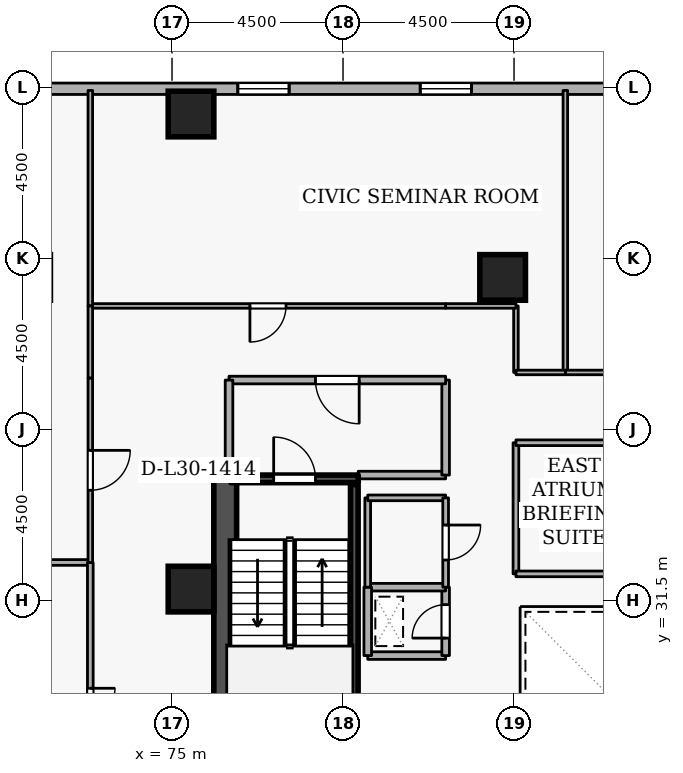
"""IFC4 building model, lengths in metres.
Left out: names, types, materials, properties, quantities, classifications, styles, units other than length and angle.
Written with IfcOpenShell. Run it as: python <this file> out.ifc"""

import sys

from ifc_helpers import new_model, si_unit, direction, frame, frame_2d, origin, origin_2d, place, context, subcontext, project, spatial, rectangle, extrude, element, fill, save


model = new_model("IFC4")
c1 = context("Model", 3, precision=1e-05, world=origin(), true_north=direction((0.0, 1.0)))
c2 = subcontext(c1, "Body", "Model", "MODEL_VIEW")
j1 = project(units=[si_unit("LENGTHUNIT", "METRE"), si_unit("PLANEANGLEUNIT", "RADIAN")], contexts=[c1])
p1 = place(None, origin())
s1 = spatial("IfcSite", under=j1, at=p1, CompositionType="ELEMENT")
p2 = place(p1, origin())
s2 = spatial("IfcBuilding", under=s1, at=p2, CompositionType="ELEMENT")
p3 = place(p2, frame((0.0, 0.0, 116.1)))
s3 = spatial("IfcBuildingStorey", under=s2, at=p3, CompositionType="ELEMENT", Elevation=116.1)
p4 = place(p3, frame((76.4, 19.2, 0.0), z_axis=(0.0, 0.0, 1.0), x_axis=(0.0, 1.0, 0.0)))
e1 = element("IfcWall", 1, at=p4, inside=s3, PredefinedType="SHEAR", context=c2, shape_type="SweptSolid", body=[
    extrude(rectangle(XDim=15.6, YDim=0.6, at=frame_2d((7.8, 0.0))), origin(), (0.0, 0.0, 1.0), 3.6),
])
for number, where, z_axis, x_axis in (
    (2, (75.5, 44.3, 0.0), (0.0, 0.0, 1.0), (1.0, 0.0, 0.0)),
    (3, (83.7, 40.0, 0.0), (0.0, 0.0, 1.0), (1.0, 0.0, 0.0)),
    (4, (75.5, 31.8, 0.0), (0.0, 0.0, 1.0), (1.0, 0.0, 0.0)),
):
    element("IfcColumn", number, at=place(p3, frame(where, z_axis=z_axis, x_axis=x_axis)), inside=s3, PredefinedType="COLUMN", context=c2, shape_type="SweptSolid", body=[
        extrude(rectangle(XDim=1.2, YDim=1.2, at=origin_2d()), origin(), (0.0, 0.0, 1.0), 3.6),
    ])
p5 = place(p3, frame((103.881, 44.965, 0.0), z_axis=(0.0, 0.0, 1.0), x_axis=(-1.0, 0.0, 0.0)))
e5 = element("IfcWall", 5, at=p5, inside=s3, PredefinedType="STANDARD", context=c2, shape_type="SweptSolid", body=[
    extrude(rectangle(XDim=36.763, YDim=0.3, at=frame_2d((18.381, 0.0))), origin(), (0.0, 0.0, 1.0), 2.22),
])
p6 = place(p5, frame((6.6, 0.0, 0.72)))
e6 = element("IfcOpeningElement", 6, at=p6, cuts=e5, PredefinedType="OPENING", context=c2, shape_type="SweptSolid", body=[
    extrude(rectangle(XDim=1.35, YDim=1.05, at=frame_2d((0.675, 0.525))), frame((0.0, 0.16, 0.0), z_axis=(0.0, -1.0, 0.0), x_axis=(1.0, 0.0, 0.0)), (0.0, 0.0, 1.0), 0.32),
])
p7 = place(p5, frame((11.4, 0.0, 0.72)))
e7 = element("IfcOpeningElement", 7, at=p7, cuts=e5, PredefinedType="OPENING", context=c2, shape_type="SweptSolid", body=[
    extrude(rectangle(XDim=1.35, YDim=1.05, at=frame_2d((0.675, 0.525))), frame((0.0, 0.16, 0.0), z_axis=(0.0, -1.0, 0.0), x_axis=(1.0, 0.0, 0.0)), (0.0, 0.0, 1.0), 0.32),
])
p8 = place(p5, frame((21.0, 0.0, 0.72)))
e8 = element("IfcOpeningElement", 8, at=p8, cuts=e5, PredefinedType="OPENING", context=c2, shape_type="SweptSolid", body=[
    extrude(rectangle(XDim=1.35, YDim=1.05, at=frame_2d((0.675, 0.525))), frame((0.0, 0.16, 0.0), z_axis=(0.0, -1.0, 0.0), x_axis=(1.0, 0.0, 0.0)), (0.0, 0.0, 1.0), 0.32),
])
p9 = place(p5, frame((25.8, 0.0, 0.72)))
e9 = element("IfcOpeningElement", 9, at=p9, cuts=e5, PredefinedType="OPENING", context=c2, shape_type="SweptSolid", body=[
    extrude(rectangle(XDim=1.35, YDim=1.05, at=frame_2d((0.675, 0.525))), frame((0.0, 0.16, 0.0), z_axis=(0.0, -1.0, 0.0), x_axis=(1.0, 0.0, 0.0)), (0.0, 0.0, 1.0), 0.32),
])
p10 = place(p3, frame((76.55, 34.7, 0.0), z_axis=(0.0, 0.0, 1.0), x_axis=(1.0, 0.0, 0.0)))
e10 = element("IfcWall", 10, at=p10, inside=s3, PredefinedType="SHEAR", context=c2, shape_type="SweptSolid", body=[
    extrude(rectangle(XDim=3.35, YDim=0.2, at=frame_2d((1.675, 0.0))), origin(), (0.0, 0.0, 1.0), 3.6),
])
p11 = place(p10, frame((1.125, 0.0, 0.0)))
e11 = element("IfcOpeningElement", 11, at=p11, cuts=e10, PredefinedType="OPENING", context=c2, shape_type="SweptSolid", body=[
    extrude(rectangle(XDim=1.1, YDim=2.1, at=frame_2d((0.55, 1.05))), frame((0.0, 0.11, 0.0), z_axis=(0.0, -1.0, 0.0), x_axis=(1.0, 0.0, 0.0)), (0.0, 0.0, 1.0), 0.22),
])
p12 = place(p3, frame((79.797, 27.45, 0.0), z_axis=(0.0, 0.0, 1.0), x_axis=(0.0, 1.0, 0.0)))
e12 = element("IfcWall", 12, at=p12, inside=s3, PredefinedType="SHEAR", context=c2, shape_type="SweptSolid", body=[
    extrude(rectangle(XDim=7.1, YDim=0.2, at=frame_2d((3.55, 0.0))), origin(), (0.0, 0.0, 1.0), 3.6),
])
p13 = place(p3, frame((79.9, 34.8, 0.0), z_axis=(0.0, 0.0, 1.0), x_axis=(1.0, 0.0, 0.0)))
e13 = element("IfcWall", 13, at=p13, inside=s3, PredefinedType="STANDARD", context=c2, shape_type="SweptSolid", body=[
    extrude(rectangle(XDim=2.3, YDim=0.2, at=frame_2d((1.15, 0.0))), origin(), (0.0, 0.0, 1.0), 2.525),
])
p14 = place(p3, frame((82.2, 34.8, 0.0), z_axis=(0.0, 0.0, 1.0), x_axis=(0.0, 1.0, 0.0)))
e14 = element("IfcWall", 14, at=p14, inside=s3, PredefinedType="STANDARD", context=c2, shape_type="SweptSolid", body=[
    extrude(rectangle(XDim=2.5, YDim=0.2, at=frame_2d((1.25, 0.0))), origin(), (0.0, 0.0, 1.0), 3.32),
])
p15 = place(p3, frame((82.2, 37.3, 0.0), z_axis=(0.0, 0.0, 1.0), x_axis=(-1.0, 0.0, 0.0)))
e15 = element("IfcWall", 15, at=p15, inside=s3, PredefinedType="STANDARD", context=c2, shape_type="SweptSolid", body=[
    extrude(rectangle(XDim=5.7, YDim=0.2, at=frame_2d((2.85, 0.0))), origin(), (0.0, 0.0, 1.0), 3.32),
])
p16 = place(p15, frame((2.275, 0.0, 0.0)))
e16 = element("IfcOpeningElement", 16, at=p16, cuts=e15, PredefinedType="OPENING", context=c2, shape_type="SweptSolid", body=[
    extrude(rectangle(XDim=1.15, YDim=2.1, at=frame_2d((0.575, 1.05))), frame((0.0, 0.11, 0.0), z_axis=(0.0, -1.0, 0.0), x_axis=(1.0, 0.0, 0.0)), (0.0, 0.0, 1.0), 0.22),
])
p17 = place(p3, frame((76.5, 37.3, 0.0), z_axis=(0.0, 0.0, 1.0), x_axis=(0.0, -1.0, 0.0)))
e17 = element("IfcWall", 17, at=p17, inside=s3, PredefinedType="STANDARD", context=c2, shape_type="SweptSolid", body=[
    extrude(rectangle(XDim=2.5, YDim=0.2, at=frame_2d((1.25, 0.0))), origin(), (0.0, 0.0, 1.0), 3.32),
])
p18 = place(p3, frame((80.15, 30.05, 0.0), z_axis=(0.0, 0.0, 1.0), x_axis=(1.0, 0.0, 0.0)))
e18 = element("IfcWall", 18, at=p18, inside=s3, PredefinedType="STANDARD", context=c2, shape_type="SweptSolid", body=[
    extrude(rectangle(XDim=2.05, YDim=0.2, at=frame_2d((1.025, 0.0))), origin(), (0.0, 0.0, 1.0), 3.32),
])
p19 = place(p3, frame((82.2, 30.05, 0.0), z_axis=(0.0, 0.0, 1.0), x_axis=(0.0, 1.0, 0.0)))
e19 = element("IfcWall", 19, at=p19, inside=s3, PredefinedType="STANDARD", context=c2, shape_type="SweptSolid", body=[
    extrude(rectangle(XDim=1.8, YDim=0.2, at=frame_2d((0.9, 0.0))), origin(), (0.0, 0.0, 1.0), 3.32),
])
p20 = place(p19, frame((0.46, 0.0, 0.0)))
e20 = element("IfcOpeningElement", 20, at=p20, cuts=e19, PredefinedType="OPENING", context=c2, shape_type="SweptSolid", body=[
    extrude(rectangle(XDim=0.88, YDim=2.04, at=frame_2d((0.44, 1.02))), frame((0.0, 0.11, 0.0), z_axis=(0.0, -1.0, 0.0), x_axis=(1.0, 0.0, 0.0)), (0.0, 0.0, 1.0), 0.22),
])
p21 = place(p3, frame((82.2, 31.85, 0.0), z_axis=(0.0, 0.0, 1.0), x_axis=(-1.0, 0.0, 0.0)))
e21 = element("IfcWall", 21, at=p21, inside=s3, PredefinedType="STANDARD", context=c2, shape_type="SweptSolid", body=[
    extrude(rectangle(XDim=2.05, YDim=0.2, at=frame_2d((1.025, 0.0))), origin(), (0.0, 0.0, 1.0), 3.32),
])
p22 = place(p3, frame((80.15, 31.85, 0.0), z_axis=(0.0, 0.0, 1.0), x_axis=(0.0, -1.0, 0.0)))
e22 = element("IfcWall", 22, at=p22, inside=s3, PredefinedType="STANDARD", context=c2, shape_type="SweptSolid", body=[
    extrude(rectangle(XDim=1.8, YDim=0.2, at=frame_2d((0.9, 0.0))), origin(), (0.0, 0.0, 1.0), 3.32),
])
p23 = place(p3, frame((80.15, 31.85, 0.0), z_axis=(0.0, 0.0, 1.0), x_axis=(0.0, 1.0, 0.0)))
e23 = element("IfcWall", 23, at=p23, inside=s3, PredefinedType="PARTITIONING", context=c2, shape_type="SweptSolid", body=[
    extrude(rectangle(XDim=2.35, YDim=0.15, at=frame_2d((1.175, 0.0))), origin(), (0.0, 0.0, 1.0), 3.32),
])
p24 = place(p3, frame((80.15, 34.2, 0.0), z_axis=(0.0, 0.0, 1.0), x_axis=(1.0, 0.0, 0.0)))
e24 = element("IfcWall", 24, at=p24, inside=s3, PredefinedType="PARTITIONING", context=c2, shape_type="SweptSolid", body=[
    extrude(rectangle(XDim=2.05, YDim=0.15, at=frame_2d((1.025, 0.0))), origin(), (0.0, 0.0, 1.0), 2.525),
])
p25 = place(p3, frame((82.2, 34.2, 0.0), z_axis=(0.0, 0.0, 1.0), x_axis=(0.0, -1.0, 0.0)))
e25 = element("IfcWall", 25, at=p25, inside=s3, PredefinedType="PARTITIONING", context=c2, shape_type="SweptSolid", body=[
    extrude(rectangle(XDim=2.35, YDim=0.15, at=frame_2d((1.175, 0.0))), origin(), (0.0, 0.0, 1.0), 3.32),
])
p26 = place(p25, frame((0.715, 0.0, 0.0)))
e26 = element("IfcOpeningElement", 26, at=p26, cuts=e25, PredefinedType="OPENING", context=c2, shape_type="SweptSolid", body=[
    extrude(rectangle(XDim=0.92, YDim=2.08, at=frame_2d((0.46, 1.04))), frame((0.0, 0.085, 0.0), z_axis=(0.0, -1.0, 0.0), x_axis=(1.0, 0.0, 0.0)), (0.0, 0.0, 1.0), 0.17),
])
p27 = place(p3, frame((85.35, 37.5, 0.0), z_axis=(0.0, 0.0, 1.0), x_axis=(0.0, 1.0, 0.0)))
e27 = element("IfcWall", 27, at=p27, inside=s3, PredefinedType="PARTITIONING", context=c2, shape_type="SweptSolid", body=[
    extrude(rectangle(XDim=7.42, YDim=0.12, at=frame_2d((3.71, 0.0))), origin(), (0.0, 0.0, 1.0), 3.32),
])
p28 = place(p3, frame((88.5, 37.5, 0.0), z_axis=(0.0, 0.0, 1.0), x_axis=(-1.0, 0.0, 0.0)))
e28 = element("IfcWall", 28, at=p28, inside=s3, PredefinedType="PARTITIONING", context=c2, shape_type="SweptSolid", body=[
    extrude(rectangle(XDim=3.15, YDim=0.12, at=frame_2d((1.575, 0.0))), origin(), (0.0, 0.0, 1.0), 3.32),
])
p29 = place(p28, frame((1.1, 0.0, 0.0)))
e29 = element("IfcOpeningElement", 29, at=p29, cuts=e28, PredefinedType="OPENING", context=c2, shape_type="SweptSolid", body=[
    extrude(rectangle(XDim=0.95, YDim=2.1, at=frame_2d((0.475, 1.05))), frame((0.0, 0.07, 0.0), z_axis=(0.0, -1.0, 0.0), x_axis=(1.0, 0.0, 0.0)), (0.0, 0.0, 1.0), 0.14),
])
p30 = place(p3, frame((84.05, 37.5, 0.0), z_axis=(0.0, 0.0, 1.0), x_axis=(0.0, 1.0, 0.0)))
e30 = element("IfcWall", 30, at=p30, inside=s3, PredefinedType="PARTITIONING", context=c2, shape_type="SweptSolid", body=[
    extrude(rectangle(XDim=1.75, YDim=0.12, at=frame_2d((0.875, 0.0))), origin(), (0.0, 0.0, 1.0), 3.32),
])
p31 = place(p3, frame((84.05, 39.25, 0.0), z_axis=(0.0, 0.0, 1.0), x_axis=(-1.0, 0.0, 0.0)))
e31 = element("IfcWall", 31, at=p31, inside=s3, PredefinedType="PARTITIONING", context=c2, shape_type="SweptSolid", body=[
    extrude(rectangle(XDim=1.85, YDim=0.12, at=frame_2d((0.925, 0.0))), origin(), (0.0, 0.0, 1.0), 3.32),
])
p32 = place(p3, frame((82.2, 39.25, 0.0), z_axis=(0.0, 0.0, 1.0), x_axis=(-1.0, 0.0, 0.0)))
e32 = element("IfcWall", 32, at=p32, inside=s3, PredefinedType="PARTITIONING", context=c2, shape_type="SweptSolid", body=[
    extrude(rectangle(XDim=9.35, YDim=0.12, at=frame_2d((4.675, 0.0))), origin(), (0.0, 0.0, 1.0), 3.32),
])
p33 = place(p32, frame((4.2, 0.0, 0.0)))
e33 = element("IfcOpeningElement", 33, at=p33, cuts=e32, PredefinedType="OPENING", context=c2, shape_type="SweptSolid", body=[
    extrude(rectangle(XDim=0.95, YDim=2.1, at=frame_2d((0.475, 1.05))), frame((0.0, 0.07, 0.0), z_axis=(0.0, -1.0, 0.0), x_axis=(1.0, 0.0, 0.0)), (0.0, 0.0, 1.0), 0.14),
])
p34 = place(p3, frame((72.85, 39.25, 0.0), z_axis=(0.0, 0.0, 1.0), x_axis=(0.0, 1.0, 0.0)))
e34 = element("IfcWall", 34, at=p34, inside=s3, PredefinedType="PARTITIONING", context=c2, shape_type="SweptSolid", body=[
    extrude(rectangle(XDim=5.67, YDim=0.12, at=frame_2d((2.835, 0.0))), origin(), (0.0, 0.0, 1.0), 3.32),
])
p35 = place(p3, frame((85.35, 37.5, 0.0), z_axis=(0.0, 0.0, 1.0), x_axis=(-1.0, 0.0, 0.0)))
e35 = element("IfcWall", 35, at=p35, inside=s3, PredefinedType="PARTITIONING", context=c2, shape_type="SweptSolid", body=[
    extrude(rectangle(XDim=1.3, YDim=0.12, at=frame_2d((0.65, 0.0))), origin(), (0.0, 0.0, 1.0), 3.32),
])
p36 = place(p3, frame((84.05, 32.2, 0.0), z_axis=(0.0, 0.0, 1.0), x_axis=(0.0, 1.0, 0.0)))
e36 = element("IfcWall", 36, at=p36, inside=s3, PredefinedType="PARTITIONING", context=c2, shape_type="SweptSolid", body=[
    extrude(rectangle(XDim=3.45, YDim=0.15, at=frame_2d((1.725, 0.0))), origin(), (0.0, 0.0, 1.0), 3.32),
])
p37 = place(p3, frame((84.05, 35.65, 0.0), z_axis=(0.0, 0.0, 1.0), x_axis=(1.0, 0.0, 0.0)))
e37 = element("IfcWall", 37, at=p37, inside=s3, PredefinedType="PARTITIONING", context=c2, shape_type="SweptSolid", body=[
    extrude(rectangle(XDim=8.9, YDim=0.15, at=frame_2d((4.45, 0.0))), origin(), (0.0, 0.0, 1.0), 3.32),
])
p38 = place(p37, frame((3.8, 0.0, 0.0)))
e38 = element("IfcOpeningElement", 38, at=p38, cuts=e37, PredefinedType="OPENING", context=c2, shape_type="SweptSolid", body=[
    extrude(rectangle(XDim=1.3, YDim=2.12, at=frame_2d((0.65, 1.06))), frame((0.0, 0.085, 0.0), z_axis=(0.0, -1.0, 0.0), x_axis=(1.0, 0.0, 0.0)), (0.0, 0.0, 1.0), 0.17),
])
p39 = place(p3, frame((92.95, 32.2, 0.0), z_axis=(0.0, 0.0, 1.0), x_axis=(-1.0, 0.0, 0.0)))
e39 = element("IfcWall", 39, at=p39, inside=s3, PredefinedType="PARTITIONING", context=c2, shape_type="SweptSolid", body=[
    extrude(rectangle(XDim=8.9, YDim=0.15, at=frame_2d((4.45, 0.0))), origin(), (0.0, 0.0, 1.0), 3.32),
])
p40 = place(p3, frame((64.58, 32.5, 0.0), z_axis=(0.0, 0.0, 1.0), x_axis=(1.0, 0.0, 0.0)))
e40 = element("IfcWall", 40, at=p40, inside=s3, PredefinedType="PARTITIONING", context=c2, shape_type="SweptSolid", body=[
    extrude(rectangle(XDim=8.27, YDim=0.15, at=frame_2d((4.135, 0.0))), origin(), (0.0, 0.0, 1.0), 3.32),
])
p41 = place(p3, frame((72.85, 32.5, 0.0), z_axis=(0.0, 0.0, 1.0), x_axis=(0.0, -1.0, 0.0)))
e41 = element("IfcWall", 41, at=p41, inside=s3, PredefinedType="PARTITIONING", context=c2, shape_type="SweptSolid", body=[
    extrude(rectangle(XDim=11.0, YDim=0.15, at=frame_2d((5.5, 0.0))), origin(), (0.0, 0.0, 1.0), 3.32),
])
p42 = place(p41, frame((3.31, 0.0, 0.0)))
e42 = element("IfcOpeningElement", 42, at=p42, cuts=e41, PredefinedType="OPENING", context=c2, shape_type="SweptSolid", body=[
    extrude(rectangle(XDim=1.3, YDim=2.12, at=frame_2d((0.65, 1.06))), frame((0.0, 0.085, 0.0), z_axis=(0.0, -1.0, 0.0), x_axis=(1.0, 0.0, 0.0)), (0.0, 0.0, 1.0), 0.17),
])
p43 = place(p3, frame((72.85, 39.25, 0.0), z_axis=(0.0, 0.0, 1.0), x_axis=(0.0, -1.0, 0.0)))
e43 = element("IfcWall", 43, at=p43, inside=s3, PredefinedType="PARTITIONING", context=c2, shape_type="SweptSolid", body=[
    extrude(rectangle(XDim=1.9, YDim=0.12, at=frame_2d((0.95, 0.0))), origin(), (0.0, 0.0, 1.0), 3.32),
])
p44 = place(p3, frame((72.85, 37.35, 0.0), z_axis=(0.0, 0.0, 1.0), x_axis=(0.0, -1.0, 0.0)))
e44 = element("IfcWall", 44, at=p44, inside=s3, PredefinedType="PARTITIONING", context=c2, shape_type="SweptSolid", body=[
    extrude(rectangle(XDim=4.85, YDim=0.12, at=frame_2d((2.425, 0.0))), origin(), (0.0, 0.0, 1.0), 2.875),
])
p45 = place(p44, frame((1.9, 0.0, 0.0)))
e45 = element("IfcOpeningElement", 45, at=p45, cuts=e44, PredefinedType="OPENING", context=c2, shape_type="SweptSolid", body=[
    extrude(rectangle(XDim=1.05, YDim=2.1, at=frame_2d((0.525, 1.05))), frame((0.0, 0.07, 0.0), z_axis=(0.0, -1.0, 0.0), x_axis=(1.0, 0.0, 0.0)), (0.0, 0.0, 1.0), 0.14),
])
p46 = place(p8, origin())
e46 = element("IfcWindow", 46, at=p46, inside=s3, PartitioningType="SINGLE_PANEL", PredefinedType="WINDOW", context=c2, shape_type="SweptSolid", body=[
    extrude(rectangle(XDim=1.35, YDim=1.05, at=frame_2d((0.675, 0.525))), frame((0.0, 0.03, 0.0), z_axis=(0.0, -1.0, 0.0), x_axis=(1.0, 0.0, 0.0)), (0.0, 0.0, 1.0), 0.06),
])
fill(e8, e46)
p47 = place(p9, origin())
e47 = element("IfcWindow", 47, at=p47, inside=s3, PartitioningType="SINGLE_PANEL", PredefinedType="WINDOW", context=c2, shape_type="SweptSolid", body=[
    extrude(rectangle(XDim=1.35, YDim=1.05, at=frame_2d((0.675, 0.525))), frame((0.0, 0.03, 0.0), z_axis=(0.0, -1.0, 0.0), x_axis=(1.0, 0.0, 0.0)), (0.0, 0.0, 1.0), 0.06),
])
fill(e9, e47)
p48 = place(p11, origin())
e48 = element("IfcDoor", 48, at=p48, inside=s3, OperationType="SINGLE_SWING_LEFT", PredefinedType="DOOR", context=c2, shape_type="SweptSolid", body=[
    extrude(rectangle(XDim=1.1, YDim=2.1, at=frame_2d((0.55, 1.05))), frame((0.0, 0.025, 0.0), z_axis=(0.0, -1.0, 0.0), x_axis=(1.0, 0.0, 0.0)), (0.0, 0.0, 1.0), 0.05),
])
fill(e11, e48)
p49 = place(p16, origin())
e49 = element("IfcDoor", 49, at=p49, inside=s3, OperationType="SINGLE_SWING_LEFT", PredefinedType="DOOR", context=c2, shape_type="SweptSolid", body=[
    extrude(rectangle(XDim=1.15, YDim=2.1, at=frame_2d((0.575, 1.05))), frame((0.0, 0.025, 0.0), z_axis=(0.0, -1.0, 0.0), x_axis=(1.0, 0.0, 0.0)), (0.0, 0.0, 1.0), 0.05),
])
fill(e16, e49)
p50 = place(p20, origin())
e50 = element("IfcDoor", 50, at=p50, inside=s3, OperationType="SINGLE_SWING_LEFT", PredefinedType="DOOR", context=c2, shape_type="SweptSolid", body=[
    extrude(rectangle(XDim=0.88, YDim=2.04, at=frame_2d((0.44, 1.02))), frame((0.0, 0.025, 0.0), z_axis=(0.0, -1.0, 0.0), x_axis=(1.0, 0.0, 0.0)), (0.0, 0.0, 1.0), 0.05),
])
fill(e20, e50)
p51 = place(p26, origin())
e51 = element("IfcDoor", 51, at=p51, inside=s3, OperationType="SINGLE_SWING_LEFT", PredefinedType="DOOR", context=c2, shape_type="SweptSolid", body=[
    extrude(rectangle(XDim=0.92, YDim=2.08, at=frame_2d((0.46, 1.04))), frame((0.0, 0.025, 0.0), z_axis=(0.0, -1.0, 0.0), x_axis=(1.0, 0.0, 0.0)), (0.0, 0.0, 1.0), 0.05),
])
fill(e26, e51)
p52 = place(p33, origin())
e52 = element("IfcDoor", 52, at=p52, inside=s3, OperationType="SINGLE_SWING_RIGHT", PredefinedType="DOOR", context=c2, shape_type="SweptSolid", body=[
    extrude(rectangle(XDim=0.95, YDim=2.1, at=frame_2d((0.475, 1.05))), frame((0.0, 0.025, 0.0), z_axis=(0.0, -1.0, 0.0), x_axis=(1.0, 0.0, 0.0)), (0.0, 0.0, 1.0), 0.05),
])
fill(e33, e52)
p53 = place(p42, origin())
e53 = element("IfcDoor", 53, at=p53, inside=s3, OperationType="DOUBLE_DOOR_SINGLE_SWING", PredefinedType="DOOR", context=c2, shape_type="SweptSolid", body=[
    extrude(rectangle(XDim=1.3, YDim=2.12, at=frame_2d((0.65, 1.06))), frame((0.0, 0.025, 0.0), z_axis=(0.0, -1.0, 0.0), x_axis=(1.0, 0.0, 0.0)), (0.0, 0.0, 1.0), 0.05),
])
fill(e42, e53)
p54 = place(p45, origin())
e54 = element("IfcDoor", 54, at=p54, inside=s3, OperationType="SINGLE_SWING_LEFT", PredefinedType="DOOR", context=c2, shape_type="SweptSolid", body=[
    extrude(rectangle(XDim=1.05, YDim=2.1, at=frame_2d((0.525, 1.05))), frame((0.0, 0.025, 0.0), z_axis=(0.0, -1.0, 0.0), x_axis=(1.0, 0.0, 0.0)), (0.0, 0.0, 1.0), 0.05),
])
fill(e45, e54)
save(model, sys.argv[1])
